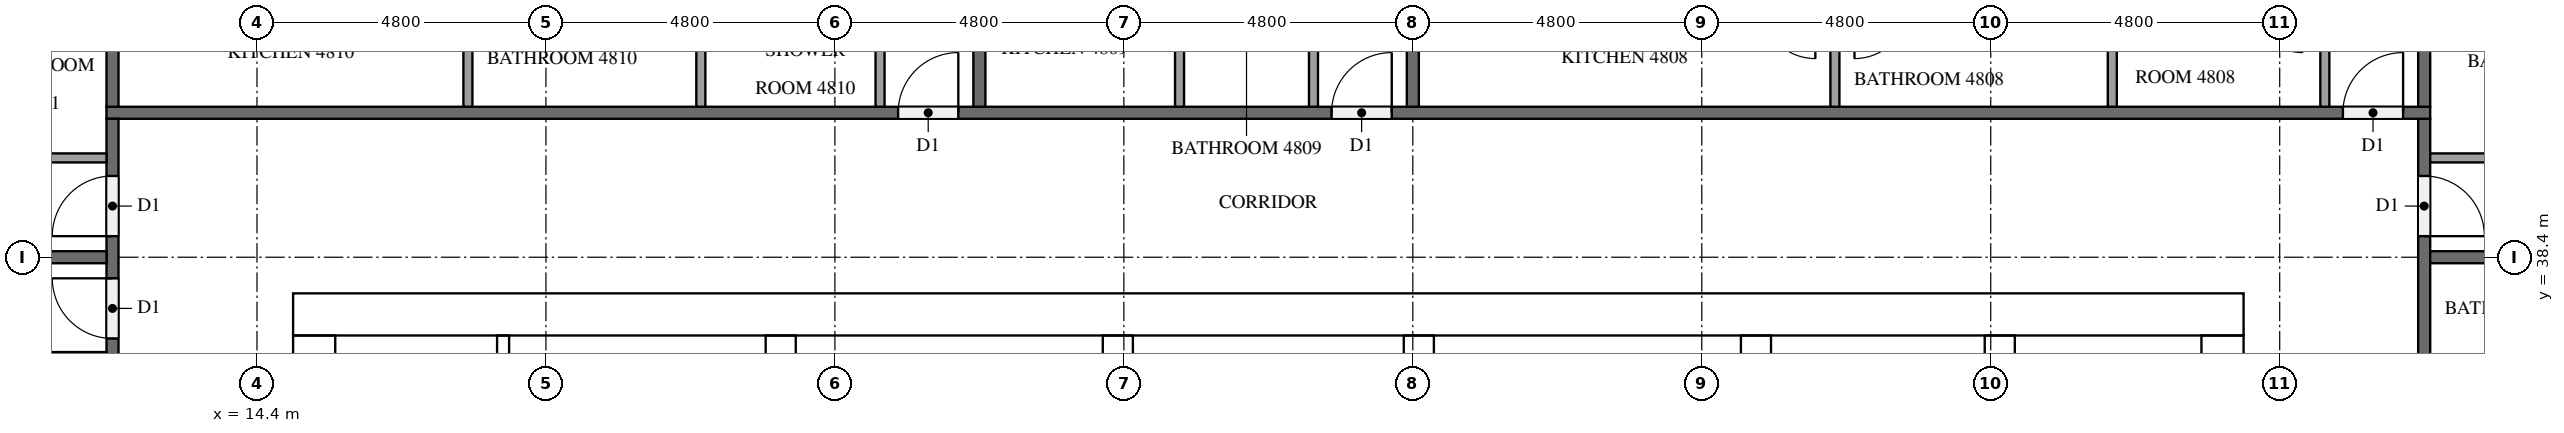
"""IFC4 building model, lengths in metres.
Left out: names, types, materials, properties, quantities, classifications, styles, units other than length and angle.
Written with IfcOpenShell. Run it as: python <this file> out.ifc"""

import sys

from ifc_helpers import new_model, si_unit, direction, frame, frame_2d, origin, place, context, subcontext, project, spatial, rectangle, extrude, element, fill, save


model = new_model("IFC4")
c1 = context("Model", 3, precision=1e-05, world=origin(), true_north=direction((0.0, 1.0)))
c2 = subcontext(c1, "Body", "Model", "MODEL_VIEW")
j1 = project(units=[si_unit("LENGTHUNIT", "METRE"), si_unit("PLANEANGLEUNIT", "RADIAN")], contexts=[c1])
p1 = place(None, origin())
s1 = spatial("IfcSite", under=j1, at=p1, CompositionType="ELEMENT")
p2 = place(p1, origin())
s2 = spatial("IfcBuilding", under=s1, at=p2, CompositionType="ELEMENT")
p3 = place(p2, frame((0.0, 0.0, 185.9)))
s3 = spatial("IfcBuildingStorey", under=s2, at=p3, CompositionType="ELEMENT", Elevation=185.9)
p4 = place(p3, frame((15.0, 37.45, 0.0), z_axis=(0.0, 0.0, 1.0), x_axis=(1.0, 0.0, 0.0)))
e1 = element("IfcWall", 1, at=p4, inside=s3, PredefinedType="SHEAR", context=c2, shape_type="SweptSolid", body=[
    extrude(rectangle(XDim=32.4, YDim=0.7, at=frame_2d((16.2, 0.0))), origin(), (0.0, 0.0, 1.0), 3.2),
])
p5 = place(p4, frame((15.3, 0.0, 0.0)))
e2 = element("IfcOpeningElement", 2, at=p5, cuts=e1, PredefinedType="OPENING", context=c2, shape_type="SweptSolid", body=[
    extrude(rectangle(XDim=1.8, YDim=2.1, at=frame_2d((0.9, 1.05))), frame((0.0, 0.36, 0.0), z_axis=(0.0, -1.0, 0.0), x_axis=(1.0, 0.0, 0.0)), (0.0, 0.0, 1.0), 0.72),
])
p6 = place(p4, frame((1.544, 0.0, 0.0)))
e3 = element("IfcOpeningElement", 3, at=p6, cuts=e1, PredefinedType="OPENING", context=c2, shape_type="SweptSolid", body=[
    extrude(rectangle(XDim=1.0, YDim=2.1, at=frame_2d((0.5, 1.05))), frame((0.0, 0.36, 0.0), z_axis=(0.0, -1.0, 0.0), x_axis=(1.0, 0.0, 0.0)), (0.0, 0.0, 1.0), 0.72),
])
p7 = place(p4, frame((5.219, 0.0, 0.0)))
e4 = element("IfcOpeningElement", 4, at=p7, cuts=e1, PredefinedType="OPENING", context=c2, shape_type="SweptSolid", body=[
    extrude(rectangle(XDim=1.0, YDim=2.1, at=frame_2d((0.5, 1.05))), frame((0.0, 0.36, 0.0), z_axis=(0.0, -1.0, 0.0), x_axis=(1.0, 0.0, 0.0)), (0.0, 0.0, 1.0), 0.72),
])
p8 = place(p3, frame((15.35, 15.7, 0.0), z_axis=(0.0, 0.0, 1.0), x_axis=(0.0, 1.0, 0.0)))
e5 = element("IfcWall", 5, at=p8, inside=s3, PredefinedType="SHEAR", context=c2, shape_type="SweptSolid", body=[
    extrude(rectangle(XDim=21.4, YDim=0.7, at=frame_2d((10.7, 0.0))), origin(), (0.0, 0.0, 1.0), 3.2),
])
p9 = place(p8, frame((5.06, 0.0, 0.0)))
e6 = element("IfcOpeningElement", 6, at=p9, cuts=e5, PredefinedType="OPENING", context=c2, shape_type="SweptSolid", body=[
    extrude(rectangle(XDim=1.2, YDim=2.1, at=frame_2d((0.6, 1.05))), frame((0.0, 0.36, 0.0), z_axis=(0.0, -1.0, 0.0), x_axis=(1.0, 0.0, 0.0)), (0.0, 0.0, 1.0), 0.72),
])
p10 = place(p3, frame((47.05, 15.7, 0.0), z_axis=(0.0, 0.0, 1.0), x_axis=(0.0, 1.0, 0.0)))
e7 = element("IfcWall", 7, at=p10, inside=s3, PredefinedType="SHEAR", context=c2, shape_type="SweptSolid", body=[
    extrude(rectangle(XDim=21.4, YDim=0.7, at=frame_2d((10.7, 0.0))), origin(), (0.0, 0.0, 1.0), 3.2),
])
p11 = place(p10, frame((10.4, 0.0, 0.0)))
e8 = element("IfcOpeningElement", 8, at=p11, cuts=e7, PredefinedType="OPENING", context=c2, shape_type="SweptSolid", body=[
    extrude(rectangle(XDim=1.2, YDim=2.1, at=frame_2d((0.6, 1.05))), frame((0.0, 0.36, 0.0), z_axis=(0.0, -1.0, 0.0), x_axis=(1.0, 0.0, 0.0)), (0.0, 0.0, 1.0), 0.72),
])
p12 = place(p3, frame((23.1, 15.7, 0.0), z_axis=(0.0, 0.0, 1.0), x_axis=(0.0, 1.0, 0.0)))
e9 = element("IfcWall", 9, at=p12, inside=s3, PredefinedType="SHEAR", context=c2, shape_type="SweptSolid", body=[
    extrude(rectangle(XDim=21.4, YDim=0.5, at=frame_2d((10.7, 0.0))), origin(), (0.0, 0.0, 1.0), 3.2),
])
p13 = place(p3, frame((39.3, 27.75, 0.0), z_axis=(0.0, 0.0, 1.0), x_axis=(0.0, 1.0, 0.0)))
e10 = element("IfcWall", 10, at=p13, inside=s3, PredefinedType="SHEAR", context=c2, shape_type="SweptSolid", body=[
    extrude(rectangle(XDim=9.35, YDim=0.5, at=frame_2d((4.675, 0.0))), origin(), (0.0, 0.0, 1.0), 3.2),
])
p14 = place(p3, frame((43.35, 27.75, 0.0), z_axis=(0.0, 0.0, 1.0), x_axis=(0.0, 1.0, 0.0)))
e11 = element("IfcWall", 11, at=p14, inside=s3, PredefinedType="SHEAR", context=c2, shape_type="SweptSolid", body=[
    extrude(rectangle(XDim=9.35, YDim=0.5, at=frame_2d((4.675, 0.0))), origin(), (0.0, 0.0, 1.0), 3.2),
])
p15 = place(p14, frame((7.65, 0.0, 0.0)))
e12 = element("IfcOpeningElement", 12, at=p15, cuts=e11, PredefinedType="OPENING", context=c2, shape_type="SweptSolid", body=[
    extrude(rectangle(XDim=1.2, YDim=2.1, at=frame_2d((0.6, 1.05))), frame((0.0, 0.26, 0.0), z_axis=(0.0, -1.0, 0.0), x_axis=(1.0, 0.0, 0.0)), (0.0, 0.0, 1.0), 0.52),
])
for number, where, z_axis, x_axis in (
    (13, (28.7, 33.8, 0.0), (0.0, 0.0, 1.0), (0.0, 1.0, 0.0)),
    (14, (33.7, 33.8, 0.0), (0.0, 0.0, 1.0), (0.0, 1.0, 0.0)),
):
    element("IfcWall", number, at=place(p3, frame(where, z_axis=z_axis, x_axis=x_axis)), inside=s3, PredefinedType="SHEAR", context=c2, shape_type="SweptSolid", body=[
        extrude(rectangle(XDim=3.3, YDim=0.5, at=frame_2d((1.65, 0.0))), origin(), (0.0, 0.0, 1.0), 3.2),
    ])
p16 = place(p3, frame((18.489, 31.5, 0.0), z_axis=(0.0, 0.0, 1.0), x_axis=(0.0, 1.0, 0.0)))
e15 = element("IfcWall", 15, at=p16, inside=s3, PredefinedType="PARTITIONING", context=c2, shape_type="SweptSolid", body=[
    extrude(rectangle(XDim=5.6, YDim=0.2, at=frame_2d((2.8, 0.0))), origin(), (0.0, 0.0, 1.0), 3.2),
])
p17 = place(p3, frame((50.4, 40.7, 0.0), z_axis=(0.0, 0.0, 1.0), x_axis=(0.0, -1.0, 0.0)))
e16 = element("IfcWall", 16, at=p17, inside=s3, PredefinedType="PARTITIONING", context=c2, shape_type="SweptSolid", body=[
    extrude(rectangle(XDim=28.6, YDim=0.2, at=frame_2d((14.3, 0.0))), origin(), (0.0, 0.0, 1.0), 3.2),
])
p18 = place(p17, frame((27.3, 0.0, 0.0)))
e17 = element("IfcOpeningElement", 17, at=p18, cuts=e16, PredefinedType="OPENING", context=c2, shape_type="SweptSolid", body=[
    extrude(rectangle(XDim=1.1, YDim=2.1, at=frame_2d((0.55, 1.05))), frame((0.0, 0.11, 0.0), z_axis=(0.0, -1.0, 0.0), x_axis=(1.0, 0.0, 0.0)), (0.0, 0.0, 1.0), 0.22),
])
p19 = place(p17, frame((8.15, 0.0, 0.0)))
e18 = element("IfcOpeningElement", 18, at=p19, cuts=e16, PredefinedType="OPENING", context=c2, shape_type="SweptSolid", body=[
    extrude(rectangle(XDim=1.0, YDim=2.1, at=frame_2d((0.5, 1.05))), frame((0.0, 0.11, 0.0), z_axis=(0.0, -1.0, 0.0), x_axis=(1.0, 0.0, 0.0)), (0.0, 0.0, 1.0), 0.22),
])
p20 = place(p17, frame((0.95, 0.0, 0.0)))
e19 = element("IfcOpeningElement", 19, at=p20, cuts=e16, PredefinedType="OPENING", context=c2, shape_type="SweptSolid", body=[
    extrude(rectangle(XDim=1.0, YDim=2.1, at=frame_2d((0.5, 1.05))), frame((0.0, 0.11, 0.0), z_axis=(0.0, -1.0, 0.0), x_axis=(1.0, 0.0, 0.0)), (0.0, 0.0, 1.0), 0.22),
])
p21 = place(p3, frame((11.9, 40.8, 0.0), z_axis=(0.0, 0.0, 1.0), x_axis=(1.0, 0.0, 0.0)))
e20 = element("IfcWall", 20, at=p21, inside=s3, PredefinedType="PARTITIONING", context=c2, shape_type="SweptSolid", body=[
    extrude(rectangle(XDim=38.6, YDim=0.2, at=frame_2d((19.3, 0.0))), origin(), (0.0, 0.0, 1.0), 3.2),
])
p22 = place(p21, frame((37.15, 0.0, 0.0)))
e21 = element("IfcOpeningElement", 21, at=p22, cuts=e20, PredefinedType="OPENING", context=c2, shape_type="SweptSolid", body=[
    extrude(rectangle(XDim=1.0, YDim=2.1, at=frame_2d((0.5, 1.05))), frame((0.0, 0.11, 0.0), z_axis=(0.0, -1.0, 0.0), x_axis=(1.0, 0.0, 0.0)), (0.0, 0.0, 1.0), 0.22),
])
p23 = place(p21, frame((20.35, 0.0, 0.0)))
e22 = element("IfcOpeningElement", 22, at=p23, cuts=e20, PredefinedType="OPENING", context=c2, shape_type="SweptSolid", body=[
    extrude(rectangle(XDim=1.0, YDim=2.1, at=frame_2d((0.5, 1.05))), frame((0.0, 0.11, 0.0), z_axis=(0.0, -1.0, 0.0), x_axis=(1.0, 0.0, 0.0)), (0.0, 0.0, 1.0), 0.22),
])
p24 = place(p21, frame((13.15, 0.0, 0.0)))
e23 = element("IfcOpeningElement", 23, at=p24, cuts=e20, PredefinedType="OPENING", context=c2, shape_type="SweptSolid", body=[
    extrude(rectangle(XDim=1.0, YDim=2.1, at=frame_2d((0.5, 1.05))), frame((0.0, 0.11, 0.0), z_axis=(0.0, -1.0, 0.0), x_axis=(1.0, 0.0, 0.0)), (0.0, 0.0, 1.0), 0.22),
])
p25 = place(p3, frame((12.0, 12.1, 0.0), z_axis=(0.0, 0.0, 1.0), x_axis=(0.0, 1.0, 0.0)))
e24 = element("IfcWall", 24, at=p25, inside=s3, PredefinedType="PARTITIONING", context=c2, shape_type="SweptSolid", body=[
    extrude(rectangle(XDim=28.6, YDim=0.2, at=frame_2d((14.3, 0.0))), origin(), (0.0, 0.0, 1.0), 3.2),
])
p26 = place(p25, frame((26.65, 0.0, 0.0)))
e25 = element("IfcOpeningElement", 25, at=p26, cuts=e24, PredefinedType="OPENING", context=c2, shape_type="SweptSolid", body=[
    extrude(rectangle(XDim=1.0, YDim=2.1, at=frame_2d((0.5, 1.05))), frame((0.0, 0.11, 0.0), z_axis=(0.0, -1.0, 0.0), x_axis=(1.0, 0.0, 0.0)), (0.0, 0.0, 1.0), 0.22),
])
p27 = place(p25, frame((24.95, 0.0, 0.0)))
e26 = element("IfcOpeningElement", 26, at=p27, cuts=e24, PredefinedType="OPENING", context=c2, shape_type="SweptSolid", body=[
    extrude(rectangle(XDim=1.0, YDim=2.1, at=frame_2d((0.5, 1.05))), frame((0.0, 0.11, 0.0), z_axis=(0.0, -1.0, 0.0), x_axis=(1.0, 0.0, 0.0)), (0.0, 0.0, 1.0), 0.22),
])
p28 = place(p25, frame((12.95, 0.0, 0.0)))
e27 = element("IfcOpeningElement", 27, at=p28, cuts=e24, PredefinedType="OPENING", context=c2, shape_type="SweptSolid", body=[
    extrude(rectangle(XDim=1.0, YDim=2.1, at=frame_2d((0.5, 1.05))), frame((0.0, 0.11, 0.0), z_axis=(0.0, -1.0, 0.0), x_axis=(1.0, 0.0, 0.0)), (0.0, 0.0, 1.0), 0.22),
])
p29 = place(p3, frame((50.5, 38.4, 0.0), z_axis=(0.0, 0.0, 1.0), x_axis=(1.0, 0.0, 0.0)))
e28 = element("IfcWall", 28, at=p29, inside=s3, PredefinedType="PARTITIONING", context=c2, shape_type="SweptSolid", body=[
    extrude(rectangle(XDim=11.8, YDim=0.2, at=frame_2d((5.9, 0.0))), origin(), (0.0, 0.0, 1.0), 3.2),
])
for number, where, z_axis, x_axis in (
    (29, (50.4, 40.9, 0.0), (0.0, 0.0, 1.0), (0.0, 1.0, 0.0)),
    (30, (33.6, 47.9, 0.0), (0.0, 0.0, 1.0), (0.0, -1.0, 0.0)),
    (31, (26.4, 47.9, 0.0), (0.0, 0.0, 1.0), (0.0, -1.0, 0.0)),
    (32, (12.0, 47.9, 0.0), (0.0, 0.0, 1.0), (0.0, -1.0, 0.0)),
    (33, (4.9, 38.4, 0.0), (0.0, 0.0, 1.0), (1.0, 0.0, 0.0)),
):
    element("IfcWall", number, at=place(p3, frame(where, z_axis=z_axis, x_axis=x_axis)), inside=s3, PredefinedType="PARTITIONING", context=c2, shape_type="SweptSolid", body=[
        extrude(rectangle(XDim=7.0, YDim=0.2, at=frame_2d((3.5, 0.0))), origin(), (0.0, 0.0, 1.0), 3.2),
    ])
p30 = place(p3, frame((50.5, 40.05, 0.0), z_axis=(0.0, 0.0, 1.0), x_axis=(1.0, 0.0, 0.0)))
e34 = element("IfcWall", 34, at=p30, inside=s3, PredefinedType="PARTITIONING", context=c2, shape_type="SweptSolid", body=[
    extrude(rectangle(XDim=3.875, YDim=0.15, at=frame_2d((1.938, 0.0))), origin(), (0.0, 0.0, 1.0), 3.2),
])
for number, where, z_axis, x_axis in (
    (35, (45.219, 40.9, 0.0), (0.0, 0.0, 1.0), (0.0, 1.0, 0.0)),
    (36, (40.612, 40.9, 0.0), (0.0, 0.0, 1.0), (0.0, 1.0, 0.0)),
):
    element("IfcWall", number, at=place(p3, frame(where, z_axis=z_axis, x_axis=x_axis)), inside=s3, PredefinedType="PARTITIONING", context=c2, shape_type="SweptSolid", body=[
        extrude(rectangle(XDim=1.625, YDim=0.15, at=frame_2d((0.812, 0.0))), origin(), (0.0, 0.0, 1.0), 3.2),
    ])
p31 = place(p3, frame((48.75, 40.9, 0.0), z_axis=(0.0, 0.0, 1.0), x_axis=(0.0, 1.0, 0.0)))
e37 = element("IfcWall", 37, at=p31, inside=s3, PredefinedType="PARTITIONING", context=c2, shape_type="SweptSolid", body=[
    extrude(rectangle(XDim=1.775, YDim=0.15, at=frame_2d((0.888, 0.0))), origin(), (0.0, 0.0, 1.0), 3.2),
])
p32 = place(p3, frame((29.725, 40.9, 0.0), z_axis=(0.0, 0.0, 1.0), x_axis=(0.0, 1.0, 0.0)))
e38 = element("IfcWall", 38, at=p32, inside=s3, PredefinedType="PARTITIONING", context=c2, shape_type="SweptSolid", body=[
    extrude(rectangle(XDim=2.075, YDim=0.15, at=frame_2d((1.038, 0.0))), origin(), (0.0, 0.0, 1.0), 3.2),
])
p33 = place(p3, frame((31.95, 40.9, 0.0), z_axis=(0.0, 0.0, 1.0), x_axis=(0.0, 1.0, 0.0)))
e39 = element("IfcWall", 39, at=p33, inside=s3, PredefinedType="PARTITIONING", context=c2, shape_type="SweptSolid", body=[
    extrude(rectangle(XDim=2.225, YDim=0.15, at=frame_2d((1.113, 0.0))), origin(), (0.0, 0.0, 1.0), 3.2),
])
for number, where, z_axis, x_axis in (
    (40, (21.773, 40.9, 0.0), (0.0, 0.0, 1.0), (0.0, 1.0, 0.0)),
    (41, (17.904, 40.9, 0.0), (0.0, 0.0, 1.0), (0.0, 1.0, 0.0)),
):
    element("IfcWall", number, at=place(p3, frame(where, z_axis=z_axis, x_axis=x_axis)), inside=s3, PredefinedType="PARTITIONING", context=c2, shape_type="SweptSolid", body=[
        extrude(rectangle(XDim=1.775, YDim=0.15, at=frame_2d((0.888, 0.0))), origin(), (0.0, 0.0, 1.0), 3.2),
    ])
p34 = place(p3, frame((24.75, 40.9, 0.0), z_axis=(0.0, 0.0, 1.0), x_axis=(0.0, 1.0, 0.0)))
e42 = element("IfcWall", 42, at=p34, inside=s3, PredefinedType="PARTITIONING", context=c2, shape_type="SweptSolid", body=[
    extrude(rectangle(XDim=1.925, YDim=0.15, at=frame_2d((0.962, 0.0))), origin(), (0.0, 0.0, 1.0), 3.2),
])
p35 = place(p3, frame((11.9, 40.05, 0.0), z_axis=(0.0, 0.0, 1.0), x_axis=(-1.0, 0.0, 0.0)))
e43 = element("IfcWall", 43, at=p35, inside=s3, PredefinedType="PARTITIONING", context=c2, shape_type="SweptSolid", body=[
    extrude(rectangle(XDim=2.375, YDim=0.15, at=frame_2d((1.188, 0.0))), origin(), (0.0, 0.0, 1.0), 3.2),
])
p36 = place(p3, frame((11.9, 36.75, 0.0), z_axis=(0.0, 0.0, 1.0), x_axis=(-1.0, 0.0, 0.0)))
e44 = element("IfcWall", 44, at=p36, inside=s3, PredefinedType="PARTITIONING", context=c2, shape_type="SweptSolid", body=[
    extrude(rectangle(XDim=1.925, YDim=0.15, at=frame_2d((0.962, 0.0))), origin(), (0.0, 0.0, 1.0), 3.2),
])
p37 = place(p5, origin())
e45 = element("IfcDoor", 45, at=p37, inside=s3, OperationType="DOUBLE_DOOR_SINGLE_SWING", PredefinedType="DOOR", context=c2, shape_type="SweptSolid", body=[
    extrude(rectangle(XDim=1.8, YDim=2.1, at=frame_2d((0.9, 1.05))), frame((0.0, 0.025, 0.0), z_axis=(0.0, -1.0, 0.0), x_axis=(1.0, 0.0, 0.0)), (0.0, 0.0, 1.0), 0.05),
])
fill(e2, e45)
p38 = place(p6, origin())
e46 = element("IfcDoor", 46, at=p38, inside=s3, OperationType="SINGLE_SWING_LEFT", PredefinedType="DOOR", context=c2, shape_type="SweptSolid", body=[
    extrude(rectangle(XDim=1.0, YDim=2.1, at=frame_2d((0.5, 1.05))), frame((0.0, 0.025, 0.0), z_axis=(0.0, -1.0, 0.0), x_axis=(1.0, 0.0, 0.0)), (0.0, 0.0, 1.0), 0.05),
])
fill(e3, e46)
p39 = place(p7, origin())
e47 = element("IfcDoor", 47, at=p39, inside=s3, OperationType="SINGLE_SWING_RIGHT", PredefinedType="DOOR", context=c2, shape_type="SweptSolid", body=[
    extrude(rectangle(XDim=1.0, YDim=2.1, at=frame_2d((0.5, 1.05))), frame((0.0, 0.025, 0.0), z_axis=(0.0, -1.0, 0.0), x_axis=(1.0, 0.0, 0.0)), (0.0, 0.0, 1.0), 0.05),
])
fill(e4, e47)
p40 = place(p20, origin())
e48 = element("IfcDoor", 48, at=p40, inside=s3, OperationType="SINGLE_SWING_RIGHT", PredefinedType="DOOR", context=c2, shape_type="SweptSolid", body=[
    extrude(rectangle(XDim=1.0, YDim=2.1, at=frame_2d((0.5, 1.05))), frame((0.0, 0.025, 0.0), z_axis=(0.0, -1.0, 0.0), x_axis=(1.0, 0.0, 0.0)), (0.0, 0.0, 1.0), 0.05),
])
fill(e19, e48)
p41 = place(p22, origin())
e49 = element("IfcDoor", 49, at=p41, inside=s3, OperationType="SINGLE_SWING_RIGHT", PredefinedType="DOOR", context=c2, shape_type="SweptSolid", body=[
    extrude(rectangle(XDim=1.0, YDim=2.1, at=frame_2d((0.5, 1.05))), frame((0.0, 0.025, 0.0), z_axis=(0.0, -1.0, 0.0), x_axis=(1.0, 0.0, 0.0)), (0.0, 0.0, 1.0), 0.05),
])
fill(e21, e49)
p42 = place(p23, origin())
e50 = element("IfcDoor", 50, at=p42, inside=s3, OperationType="SINGLE_SWING_RIGHT", PredefinedType="DOOR", context=c2, shape_type="SweptSolid", body=[
    extrude(rectangle(XDim=1.0, YDim=2.1, at=frame_2d((0.5, 1.05))), frame((0.0, 0.025, 0.0), z_axis=(0.0, -1.0, 0.0), x_axis=(1.0, 0.0, 0.0)), (0.0, 0.0, 1.0), 0.05),
])
fill(e22, e50)
p43 = place(p24, origin())
e51 = element("IfcDoor", 51, at=p43, inside=s3, OperationType="SINGLE_SWING_RIGHT", PredefinedType="DOOR", context=c2, shape_type="SweptSolid", body=[
    extrude(rectangle(XDim=1.0, YDim=2.1, at=frame_2d((0.5, 1.05))), frame((0.0, 0.025, 0.0), z_axis=(0.0, -1.0, 0.0), x_axis=(1.0, 0.0, 0.0)), (0.0, 0.0, 1.0), 0.05),
])
fill(e23, e51)
p44 = place(p26, origin())
e52 = element("IfcDoor", 52, at=p44, inside=s3, OperationType="SINGLE_SWING_LEFT", PredefinedType="DOOR", context=c2, shape_type="SweptSolid", body=[
    extrude(rectangle(XDim=1.0, YDim=2.1, at=frame_2d((0.5, 1.05))), frame((0.0, 0.025, 0.0), z_axis=(0.0, -1.0, 0.0), x_axis=(1.0, 0.0, 0.0)), (0.0, 0.0, 1.0), 0.05),
])
fill(e25, e52)
p45 = place(p27, origin())
e53 = element("IfcDoor", 53, at=p45, inside=s3, OperationType="SINGLE_SWING_RIGHT", PredefinedType="DOOR", context=c2, shape_type="SweptSolid", body=[
    extrude(rectangle(XDim=1.0, YDim=2.1, at=frame_2d((0.5, 1.05))), frame((0.0, 0.025, 0.0), z_axis=(0.0, -1.0, 0.0), x_axis=(1.0, 0.0, 0.0)), (0.0, 0.0, 1.0), 0.05),
])
fill(e26, e53)
save(model, sys.argv[1])
